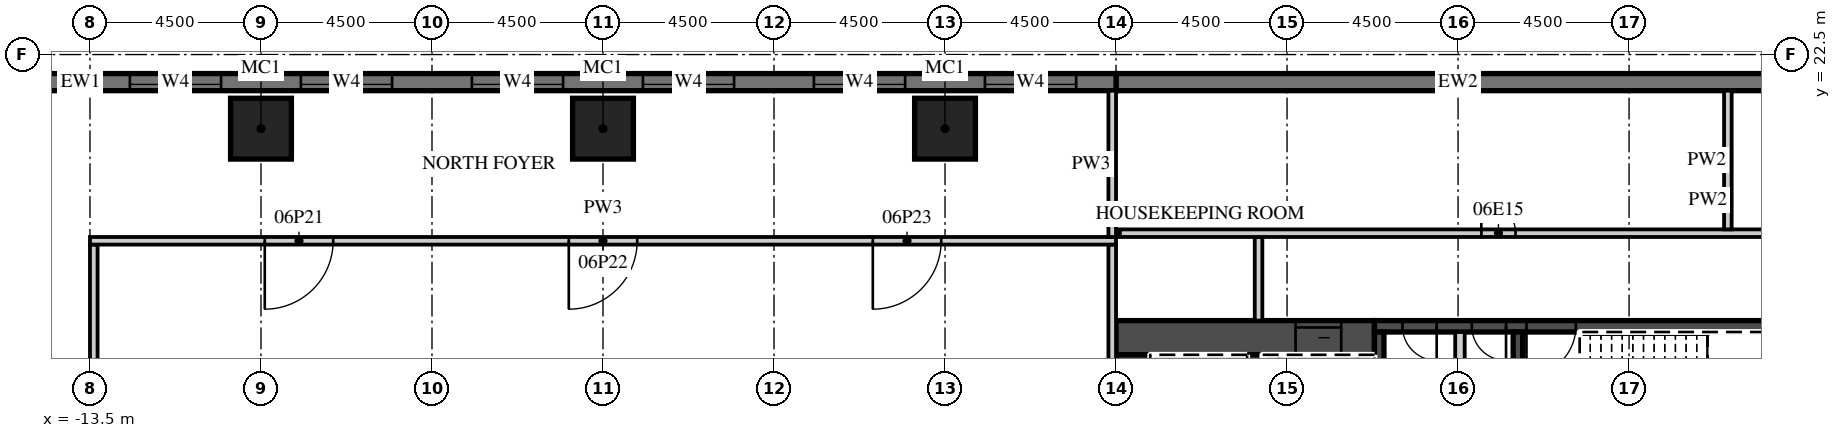
"""IFC4 building model, lengths in metres.
Left out: names, types, materials, properties, quantities, classifications, styles, units other than length and angle.
Written with IfcOpenShell. Run it as: python <this file> out.ifc"""

import sys

from ifc_helpers import new_model, si_unit, direction, frame, frame_2d, origin, origin_2d, place, context, subcontext, project, spatial, rectangle, extrude, element, fill, save


model = new_model("IFC4")
c1 = context("Model", 3, precision=1e-05, world=origin(), true_north=direction((0.0, 1.0)))
c2 = subcontext(c1, "Body", "Model", "MODEL_VIEW")
j1 = project(units=[si_unit("LENGTHUNIT", "METRE"), si_unit("PLANEANGLEUNIT", "RADIAN")], contexts=[c1])
p1 = place(None, origin())
s1 = spatial("IfcSite", under=j1, at=p1, CompositionType="ELEMENT")
p2 = place(p1, origin())
s2 = spatial("IfcBuilding", under=s1, at=p2, CompositionType="ELEMENT")
p3 = place(p2, frame((0.0, 0.0, 38.0)))
s3 = spatial("IfcBuildingStorey", under=s2, at=p3, CompositionType="ELEMENT", Elevation=38.0)
for number, where, z_axis, x_axis in (
    (1, (-9.0, 20.55, 0.0), (0.0, 0.0, 1.0), (1.0, 0.0, 0.0)),
    (2, (0.0, 20.55, 0.0), (0.0, 0.0, 1.0), (1.0, 0.0, 0.0)),
    (3, (9.0, 20.55, 0.0), (0.0, 0.0, 1.0), (1.0, 0.0, 0.0)),
):
    element("IfcColumn", number, at=place(p3, frame(where, z_axis=z_axis, x_axis=x_axis)), inside=s3, PredefinedType="COLUMN", context=c2, shape_type="SweptSolid", body=[
        extrude(rectangle(XDim=1.6, YDim=1.6, at=origin_2d()), origin(), (0.0, 0.0, 1.0), 8.7),
    ])
p4 = place(p3, frame((31.5, 21.775, 0.0), z_axis=(0.0, 0.0, 1.0), x_axis=(-1.0, 0.0, 0.0)))
e4 = element("IfcWall", 4, at=p4, inside=s3, PredefinedType="SOLIDWALL", context=c2, shape_type="SweptSolid", body=[
    extrude(rectangle(XDim=18.0, YDim=0.45, at=frame_2d((9.0, 0.0))), origin(), (0.0, 0.0, 1.0), 8.7),
])
p5 = place(p3, frame((13.5, 21.775, 0.0), z_axis=(0.0, 0.0, 1.0), x_axis=(-1.0, 0.0, 0.0)))
e5 = element("IfcWall", 5, at=p5, inside=s3, PredefinedType="SOLIDWALL", context=c2, shape_type="SweptSolid", body=[
    extrude(rectangle(XDim=54.5, YDim=0.45, at=frame_2d((27.25, 0.0))), origin(), (0.0, 0.0, 1.0), 8.7),
])
p6 = place(p5, frame((1.05, 0.0, 0.9)))
e6 = element("IfcOpeningElement", 6, at=p6, cuts=e5, PredefinedType="OPENING", context=c2, shape_type="SweptSolid", body=[
    extrude(rectangle(XDim=2.4, YDim=1.8, at=frame_2d((1.2, 0.9))), frame((0.0, 0.235, 0.0), z_axis=(0.0, -1.0, 0.0), x_axis=(1.0, 0.0, 0.0)), (0.0, 0.0, 1.0), 0.47),
])
p7 = place(p5, frame((5.55, 0.0, 0.9)))
e7 = element("IfcOpeningElement", 7, at=p7, cuts=e5, PredefinedType="OPENING", context=c2, shape_type="SweptSolid", body=[
    extrude(rectangle(XDim=2.4, YDim=1.8, at=frame_2d((1.2, 0.9))), frame((0.0, 0.235, 0.0), z_axis=(0.0, -1.0, 0.0), x_axis=(1.0, 0.0, 0.0)), (0.0, 0.0, 1.0), 0.47),
])
p8 = place(p5, frame((10.05, 0.0, 0.9)))
e8 = element("IfcOpeningElement", 8, at=p8, cuts=e5, PredefinedType="OPENING", context=c2, shape_type="SweptSolid", body=[
    extrude(rectangle(XDim=2.4, YDim=1.8, at=frame_2d((1.2, 0.9))), frame((0.0, 0.235, 0.0), z_axis=(0.0, -1.0, 0.0), x_axis=(1.0, 0.0, 0.0)), (0.0, 0.0, 1.0), 0.47),
])
p9 = place(p5, frame((14.55, 0.0, 0.9)))
e9 = element("IfcOpeningElement", 9, at=p9, cuts=e5, PredefinedType="OPENING", context=c2, shape_type="SweptSolid", body=[
    extrude(rectangle(XDim=2.4, YDim=1.8, at=frame_2d((1.2, 0.9))), frame((0.0, 0.235, 0.0), z_axis=(0.0, -1.0, 0.0), x_axis=(1.0, 0.0, 0.0)), (0.0, 0.0, 1.0), 0.47),
])
p10 = place(p5, frame((19.05, 0.0, 0.9)))
e10 = element("IfcOpeningElement", 10, at=p10, cuts=e5, PredefinedType="OPENING", context=c2, shape_type="SweptSolid", body=[
    extrude(rectangle(XDim=2.4, YDim=1.8, at=frame_2d((1.2, 0.9))), frame((0.0, 0.235, 0.0), z_axis=(0.0, -1.0, 0.0), x_axis=(1.0, 0.0, 0.0)), (0.0, 0.0, 1.0), 0.47),
])
p11 = place(p5, frame((23.55, 0.0, 0.9)))
e11 = element("IfcOpeningElement", 11, at=p11, cuts=e5, PredefinedType="OPENING", context=c2, shape_type="SweptSolid", body=[
    extrude(rectangle(XDim=2.4, YDim=1.8, at=frame_2d((1.2, 0.9))), frame((0.0, 0.235, 0.0), z_axis=(0.0, -1.0, 0.0), x_axis=(1.0, 0.0, 0.0)), (0.0, 0.0, 1.0), 0.47),
])
p12 = place(p5, frame((28.05, 0.0, 0.9)))
e12 = element("IfcOpeningElement", 12, at=p12, cuts=e5, PredefinedType="OPENING", context=c2, shape_type="SweptSolid", body=[
    extrude(rectangle(XDim=2.4, YDim=1.8, at=frame_2d((1.2, 0.9))), frame((0.0, 0.235, 0.0), z_axis=(0.0, -1.0, 0.0), x_axis=(1.0, 0.0, 0.0)), (0.0, 0.0, 1.0), 0.47),
])
p13 = place(p5, frame((32.55, 0.0, 0.9)))
e13 = element("IfcOpeningElement", 13, at=p13, cuts=e5, PredefinedType="OPENING", context=c2, shape_type="SweptSolid", body=[
    extrude(rectangle(XDim=2.4, YDim=1.8, at=frame_2d((1.2, 0.9))), frame((0.0, 0.235, 0.0), z_axis=(0.0, -1.0, 0.0), x_axis=(1.0, 0.0, 0.0)), (0.0, 0.0, 1.0), 0.47),
])
p14 = place(p5, frame((37.05, 0.0, 0.9)))
e14 = element("IfcOpeningElement", 14, at=p14, cuts=e5, PredefinedType="OPENING", context=c2, shape_type="SweptSolid", body=[
    extrude(rectangle(XDim=2.4, YDim=1.8, at=frame_2d((1.2, 0.9))), frame((0.0, 0.235, 0.0), z_axis=(0.0, -1.0, 0.0), x_axis=(1.0, 0.0, 0.0)), (0.0, 0.0, 1.0), 0.47),
])
p15 = place(p5, frame((41.55, 0.0, 0.9)))
e15 = element("IfcOpeningElement", 15, at=p15, cuts=e5, PredefinedType="OPENING", context=c2, shape_type="SweptSolid", body=[
    extrude(rectangle(XDim=2.4, YDim=1.8, at=frame_2d((1.2, 0.9))), frame((0.0, 0.235, 0.0), z_axis=(0.0, -1.0, 0.0), x_axis=(1.0, 0.0, 0.0)), (0.0, 0.0, 1.0), 0.47),
])
p16 = place(p5, frame((46.05, 0.0, 0.9)))
e16 = element("IfcOpeningElement", 16, at=p16, cuts=e5, PredefinedType="OPENING", context=c2, shape_type="SweptSolid", body=[
    extrude(rectangle(XDim=2.4, YDim=1.8, at=frame_2d((1.2, 0.9))), frame((0.0, 0.235, 0.0), z_axis=(0.0, -1.0, 0.0), x_axis=(1.0, 0.0, 0.0)), (0.0, 0.0, 1.0), 0.47),
])
p17 = place(p3, frame((13.5, 15.05, 0.0), z_axis=(0.0, 0.0, 1.0), x_axis=(1.0, 0.0, 0.0)))
e17 = element("IfcWall", 17, at=p17, inside=s3, PredefinedType="SHEAR", context=c2, shape_type="SweptSolid", body=[
    extrude(rectangle(XDim=6.8, YDim=0.9, at=frame_2d((3.4, 0.0))), origin(), (0.0, 0.0, 1.0), 8.7),
])
p18 = place(p17, frame((4.725, 0.0, 0.0)))
e18 = element("IfcOpeningElement", 18, at=p18, cuts=e17, PredefinedType="OPENING", context=c2, shape_type="SweptSolid", body=[
    extrude(rectangle(XDim=1.2, YDim=2.1, at=frame_2d((0.6, 1.05))), frame((0.0, 0.46, 0.0), z_axis=(0.0, -1.0, 0.0), x_axis=(1.0, 0.0, 0.0)), (0.0, 0.0, 1.0), 0.92),
])
p19 = place(p3, frame((20.3, 15.35, 0.0), z_axis=(0.0, 0.0, 1.0), x_axis=(1.0, 0.0, 0.0)))
e19 = element("IfcWall", 19, at=p19, inside=s3, PredefinedType="SHEAR", context=c2, shape_type="SweptSolid", body=[
    extrude(rectangle(XDim=10.3, YDim=0.3, at=frame_2d((5.15, 0.0))), origin(), (0.0, 0.0, 1.0), 8.7),
])
p20 = place(p19, frame((4.0, 0.0, 0.0)))
e20 = element("IfcOpeningElement", 20, at=p20, cuts=e19, PredefinedType="OPENING", context=c2, shape_type="SweptSolid", body=[
    extrude(rectangle(XDim=1.3, YDim=2.1, at=frame_2d((0.65, 1.05))), frame((0.0, 0.16, 0.0), z_axis=(0.0, -1.0, 0.0), x_axis=(1.0, 0.0, 0.0)), (0.0, 0.0, 1.0), 0.32),
])
p21 = place(p19, frame((2.562, 0.0, 0.0)))
e21 = element("IfcOpeningElement", 21, at=p21, cuts=e19, PredefinedType="OPENING", context=c2, shape_type="SweptSolid", body=[
    extrude(rectangle(XDim=0.9, YDim=2.1, at=frame_2d((0.45, 1.05))), frame((0.0, 0.16, 0.0), z_axis=(0.0, -1.0, 0.0), x_axis=(1.0, 0.0, 0.0)), (0.0, 0.0, 1.0), 0.32),
])
p22 = place(p19, frame((0.738, 0.0, 0.0)))
e22 = element("IfcOpeningElement", 22, at=p22, cuts=e19, PredefinedType="OPENING", context=c2, shape_type="SweptSolid", body=[
    extrude(rectangle(XDim=0.9, YDim=2.1, at=frame_2d((0.45, 1.05))), frame((0.0, 0.16, 0.0), z_axis=(0.0, -1.0, 0.0), x_axis=(1.0, 0.0, 0.0)), (0.0, 0.0, 1.0), 0.32),
])
p23 = place(p3, frame((13.95, 2.4, 0.0), z_axis=(0.0, 0.0, 1.0), x_axis=(0.0, 1.0, 0.0)))
e23 = element("IfcWall", 23, at=p23, inside=s3, PredefinedType="SHEAR", context=c2, shape_type="SweptSolid", body=[
    extrude(rectangle(XDim=12.2, YDim=0.9, at=frame_2d((6.1, 0.0))), origin(), (0.0, 0.0, 1.0), 8.7),
])
p24 = place(p3, frame((17.15, 8.8, 0.0), z_axis=(0.0, 0.0, 1.0), x_axis=(0.0, 1.0, 0.0)))
e24 = element("IfcWall", 24, at=p24, inside=s3, PredefinedType="SHEAR", context=c2, shape_type="SweptSolid", body=[
    extrude(rectangle(XDim=5.8, YDim=0.4, at=frame_2d((2.9, 0.0))), origin(), (0.0, 0.0, 1.0), 8.7),
])
for number, where, z_axis, x_axis in (
    (25, (20.425, 11.95, 0.0), (0.0, 0.0, 1.0), (0.0, 1.0, 0.0)),
    (26, (24.075, 11.95, 0.0), (0.0, 0.0, 1.0), (0.0, 1.0, 0.0)),
):
    element("IfcWall", number, at=place(p3, frame(where, z_axis=z_axis, x_axis=x_axis)), inside=s3, PredefinedType="SHEAR", context=c2, shape_type="SweptSolid", body=[
        extrude(rectangle(XDim=3.25, YDim=0.25, at=frame_2d((1.625, 0.0))), origin(), (0.0, 0.0, 1.0), 8.7),
    ])
p25 = place(p3, frame((22.55, 11.95, 0.0), z_axis=(0.0, 0.0, 1.0), x_axis=(0.0, 1.0, 0.0)))
e27 = element("IfcWall", 27, at=p25, inside=s3, PredefinedType="PARTITIONING", context=c2, shape_type="SweptSolid", body=[
    extrude(rectangle(XDim=3.25, YDim=0.25, at=frame_2d((1.625, 0.0))), origin(), (0.0, 0.0, 1.0), 8.7),
])
p26 = place(p3, frame((17.25, 15.5, 0.0), z_axis=(0.0, 0.0, 1.0), x_axis=(0.0, 1.0, 0.0)))
e28 = element("IfcWall", 28, at=p26, inside=s3, PredefinedType="PARTITIONING", context=c2, shape_type="SweptSolid", body=[
    extrude(rectangle(XDim=2.2, YDim=0.2, at=frame_2d((1.1, 0.0))), origin(), (0.0, 0.0, 1.0), 8.7),
])
p27 = place(p3, frame((13.6, 17.8, 0.0), z_axis=(0.0, 0.0, 1.0), x_axis=(1.0, 0.0, 0.0)))
e29 = element("IfcWall", 29, at=p27, inside=s3, PredefinedType="PARTITIONING", context=c2, shape_type="SweptSolid", body=[
    extrude(rectangle(XDim=30.95, YDim=0.2, at=frame_2d((15.475, 0.0))), origin(), (0.0, 0.0, 1.0), 8.7),
])
p28 = place(p27, frame((17.812, 0.0, 0.0)))
e30 = element("IfcOpeningElement", 30, at=p28, cuts=e29, PredefinedType="OPENING", context=c2, shape_type="SweptSolid", body=[
    extrude(rectangle(XDim=0.9, YDim=2.1, at=frame_2d((0.45, 1.05))), frame((0.0, 0.11, 0.0), z_axis=(0.0, -1.0, 0.0), x_axis=(1.0, 0.0, 0.0)), (0.0, 0.0, 1.0), 0.22),
])
p29 = place(p27, frame((9.512, 0.0, 0.0)))
e31 = element("IfcOpeningElement", 31, at=p29, cuts=e29, PredefinedType="OPENING", context=c2, shape_type="SweptSolid", body=[
    extrude(rectangle(XDim=0.9, YDim=2.1, at=frame_2d((0.45, 1.05))), frame((0.0, 0.11, 0.0), z_axis=(0.0, -1.0, 0.0), x_axis=(1.0, 0.0, 0.0)), (0.0, 0.0, 1.0), 0.22),
])
p30 = place(p3, frame((29.6, 17.9, 0.0), z_axis=(0.0, 0.0, 1.0), x_axis=(0.0, 1.0, 0.0)))
e32 = element("IfcWall", 32, at=p30, inside=s3, PredefinedType="PARTITIONING", context=c2, shape_type="SweptSolid", body=[
    extrude(rectangle(XDim=3.65, YDim=0.2, at=frame_2d((1.825, 0.0))), origin(), (0.0, 0.0, 1.0), 8.7),
])
p31 = place(p3, frame((-13.4, -17.5, 0.0), z_axis=(0.0, 0.0, 1.0), x_axis=(0.0, 1.0, 0.0)))
e33 = element("IfcWall", 33, at=p31, inside=s3, PredefinedType="PARTITIONING", context=c2, shape_type="SweptSolid", body=[
    extrude(rectangle(XDim=35.0, YDim=0.2, at=frame_2d((17.5, 0.0))), origin(), (0.0, 0.0, 1.0), 8.7),
])
p32 = place(p31, frame((22.6, 0.0, 0.0)))
e34 = element("IfcOpeningElement", 34, at=p32, cuts=e33, PredefinedType="OPENING", context=c2, shape_type="SweptSolid", body=[
    extrude(rectangle(XDim=1.8, YDim=2.1, at=frame_2d((0.9, 1.05))), frame((0.0, 0.11, 0.0), z_axis=(0.0, -1.0, 0.0), x_axis=(1.0, 0.0, 0.0)), (0.0, 0.0, 1.0), 0.22),
])
p33 = place(p31, frame((28.6, 0.0, 0.0)))
e35 = element("IfcOpeningElement", 35, at=p33, cuts=e33, PredefinedType="OPENING", context=c2, shape_type="SweptSolid", body=[
    extrude(rectangle(XDim=1.8, YDim=2.1, at=frame_2d((0.9, 1.05))), frame((0.0, 0.11, 0.0), z_axis=(0.0, -1.0, 0.0), x_axis=(1.0, 0.0, 0.0)), (0.0, 0.0, 1.0), 0.22),
])
p34 = place(p3, frame((13.4, -17.5, 0.0), z_axis=(0.0, 0.0, 1.0), x_axis=(0.0, 1.0, 0.0)))
e36 = element("IfcWall", 36, at=p34, inside=s3, PredefinedType="PARTITIONING", context=c2, shape_type="SweptSolid", body=[
    extrude(rectangle(XDim=35.0, YDim=0.2, at=frame_2d((17.5, 0.0))), origin(), (0.0, 0.0, 1.0), 8.7),
])
p35 = place(p34, frame((10.6, 0.0, 0.0)))
e37 = element("IfcOpeningElement", 37, at=p35, cuts=e36, PredefinedType="OPENING", context=c2, shape_type="SweptSolid", body=[
    extrude(rectangle(XDim=1.8, YDim=2.1, at=frame_2d((0.9, 1.05))), frame((0.0, 0.11, 0.0), z_axis=(0.0, -1.0, 0.0), x_axis=(1.0, 0.0, 0.0)), (0.0, 0.0, 1.0), 0.22),
])
p36 = place(p34, frame((4.6, 0.0, 0.0)))
e38 = element("IfcOpeningElement", 38, at=p36, cuts=e36, PredefinedType="OPENING", context=c2, shape_type="SweptSolid", body=[
    extrude(rectangle(XDim=1.8, YDim=2.1, at=frame_2d((0.9, 1.05))), frame((0.0, 0.11, 0.0), z_axis=(0.0, -1.0, 0.0), x_axis=(1.0, 0.0, 0.0)), (0.0, 0.0, 1.0), 0.22),
])
p37 = place(p3, frame((-13.5, 17.6, 0.0), z_axis=(0.0, 0.0, 1.0), x_axis=(1.0, 0.0, 0.0)))
e39 = element("IfcWall", 39, at=p37, inside=s3, PredefinedType="PARTITIONING", context=c2, shape_type="SweptSolid", body=[
    extrude(rectangle(XDim=27.0, YDim=0.2, at=frame_2d((13.5, 0.0))), origin(), (0.0, 0.0, 1.0), 8.7),
])
p38 = place(p37, frame((4.6, 0.0, 0.0)))
e40 = element("IfcOpeningElement", 40, at=p38, cuts=e39, PredefinedType="OPENING", context=c2, shape_type="SweptSolid", body=[
    extrude(rectangle(XDim=1.8, YDim=2.1, at=frame_2d((0.9, 1.05))), frame((0.0, 0.11, 0.0), z_axis=(0.0, -1.0, 0.0), x_axis=(1.0, 0.0, 0.0)), (0.0, 0.0, 1.0), 0.22),
])
p39 = place(p37, frame((12.6, 0.0, 0.0)))
e41 = element("IfcOpeningElement", 41, at=p39, cuts=e39, PredefinedType="OPENING", context=c2, shape_type="SweptSolid", body=[
    extrude(rectangle(XDim=1.8, YDim=2.1, at=frame_2d((0.9, 1.05))), frame((0.0, 0.11, 0.0), z_axis=(0.0, -1.0, 0.0), x_axis=(1.0, 0.0, 0.0)), (0.0, 0.0, 1.0), 0.22),
])
p40 = place(p37, frame((20.6, 0.0, 0.0)))
e42 = element("IfcOpeningElement", 42, at=p40, cuts=e39, PredefinedType="OPENING", context=c2, shape_type="SweptSolid", body=[
    extrude(rectangle(XDim=1.8, YDim=2.1, at=frame_2d((0.9, 1.05))), frame((0.0, 0.11, 0.0), z_axis=(0.0, -1.0, 0.0), x_axis=(1.0, 0.0, 0.0)), (0.0, 0.0, 1.0), 0.22),
])
p41 = place(p3, frame((13.4, 17.7, 0.0), z_axis=(0.0, 0.0, 1.0), x_axis=(0.0, 1.0, 0.0)))
e43 = element("IfcWall", 43, at=p41, inside=s3, PredefinedType="PARTITIONING", context=c2, shape_type="SweptSolid", body=[
    extrude(rectangle(XDim=3.85, YDim=0.2, at=frame_2d((1.925, 0.0))), origin(), (0.0, 0.0, 1.0), 8.7),
])
p42 = place(p6, origin())
e44 = element("IfcWindow", 44, at=p42, inside=s3, PartitioningType="SINGLE_PANEL", PredefinedType="WINDOW", context=c2, shape_type="SweptSolid", body=[
    extrude(rectangle(XDim=2.4, YDim=1.8, at=frame_2d((1.2, 0.9))), frame((0.0, 0.09, 0.0), z_axis=(0.0, -1.0, 0.0), x_axis=(1.0, 0.0, 0.0)), (0.0, 0.0, 1.0), 0.06),
])
fill(e6, e44)
p43 = place(p7, origin())
e45 = element("IfcWindow", 45, at=p43, inside=s3, PartitioningType="SINGLE_PANEL", PredefinedType="WINDOW", context=c2, shape_type="SweptSolid", body=[
    extrude(rectangle(XDim=2.4, YDim=1.8, at=frame_2d((1.2, 0.9))), frame((0.0, 0.09, 0.0), z_axis=(0.0, -1.0, 0.0), x_axis=(1.0, 0.0, 0.0)), (0.0, 0.0, 1.0), 0.06),
])
fill(e7, e45)
p44 = place(p8, origin())
e46 = element("IfcWindow", 46, at=p44, inside=s3, PartitioningType="SINGLE_PANEL", PredefinedType="WINDOW", context=c2, shape_type="SweptSolid", body=[
    extrude(rectangle(XDim=2.4, YDim=1.8, at=frame_2d((1.2, 0.9))), frame((0.0, 0.09, 0.0), z_axis=(0.0, -1.0, 0.0), x_axis=(1.0, 0.0, 0.0)), (0.0, 0.0, 1.0), 0.06),
])
fill(e8, e46)
p45 = place(p9, origin())
e47 = element("IfcWindow", 47, at=p45, inside=s3, PartitioningType="SINGLE_PANEL", PredefinedType="WINDOW", context=c2, shape_type="SweptSolid", body=[
    extrude(rectangle(XDim=2.4, YDim=1.8, at=frame_2d((1.2, 0.9))), frame((0.0, 0.09, 0.0), z_axis=(0.0, -1.0, 0.0), x_axis=(1.0, 0.0, 0.0)), (0.0, 0.0, 1.0), 0.06),
])
fill(e9, e47)
p46 = place(p10, origin())
e48 = element("IfcWindow", 48, at=p46, inside=s3, PartitioningType="SINGLE_PANEL", PredefinedType="WINDOW", context=c2, shape_type="SweptSolid", body=[
    extrude(rectangle(XDim=2.4, YDim=1.8, at=frame_2d((1.2, 0.9))), frame((0.0, 0.09, 0.0), z_axis=(0.0, -1.0, 0.0), x_axis=(1.0, 0.0, 0.0)), (0.0, 0.0, 1.0), 0.06),
])
fill(e10, e48)
p47 = place(p11, origin())
e49 = element("IfcWindow", 49, at=p47, inside=s3, PartitioningType="SINGLE_PANEL", PredefinedType="WINDOW", context=c2, shape_type="SweptSolid", body=[
    extrude(rectangle(XDim=2.4, YDim=1.8, at=frame_2d((1.2, 0.9))), frame((0.0, 0.09, 0.0), z_axis=(0.0, -1.0, 0.0), x_axis=(1.0, 0.0, 0.0)), (0.0, 0.0, 1.0), 0.06),
])
fill(e11, e49)
p48 = place(p18, origin())
e50 = element("IfcDoor", 50, at=p48, inside=s3, OperationType="SLIDING_TO_LEFT", PredefinedType="DOOR", context=c2, shape_type="SweptSolid", body=[
    extrude(rectangle(XDim=1.2, YDim=2.1, at=frame_2d((0.6, 1.05))), frame((0.0, 0.025, 0.0), z_axis=(0.0, -1.0, 0.0), x_axis=(1.0, 0.0, 0.0)), (0.0, 0.0, 1.0), 0.05),
])
fill(e18, e50)
p49 = place(p20, origin())
e51 = element("IfcDoor", 51, at=p49, inside=s3, OperationType="SINGLE_SWING_LEFT", PredefinedType="DOOR", context=c2, shape_type="SweptSolid", body=[
    extrude(rectangle(XDim=1.3, YDim=2.1, at=frame_2d((0.65, 1.05))), frame((0.0, 0.025, 0.0), z_axis=(0.0, -1.0, 0.0), x_axis=(1.0, 0.0, 0.0)), (0.0, 0.0, 1.0), 0.05),
])
fill(e20, e51)
p50 = place(p21, origin())
e52 = element("IfcDoor", 52, at=p50, inside=s3, OperationType="SINGLE_SWING_RIGHT", PredefinedType="DOOR", context=c2, shape_type="SweptSolid", body=[
    extrude(rectangle(XDim=0.9, YDim=2.1, at=frame_2d((0.45, 1.05))), frame((0.0, 0.025, 0.0), z_axis=(0.0, -1.0, 0.0), x_axis=(1.0, 0.0, 0.0)), (0.0, 0.0, 1.0), 0.05),
])
fill(e21, e52)
p51 = place(p22, origin())
e53 = element("IfcDoor", 53, at=p51, inside=s3, OperationType="SINGLE_SWING_RIGHT", PredefinedType="DOOR", context=c2, shape_type="SweptSolid", body=[
    extrude(rectangle(XDim=0.9, YDim=2.1, at=frame_2d((0.45, 1.05))), frame((0.0, 0.025, 0.0), z_axis=(0.0, -1.0, 0.0), x_axis=(1.0, 0.0, 0.0)), (0.0, 0.0, 1.0), 0.05),
])
fill(e22, e53)
p52 = place(p29, origin())
e54 = element("IfcDoor", 54, at=p52, inside=s3, OperationType="SINGLE_SWING_LEFT", PredefinedType="DOOR", context=c2, shape_type="SweptSolid", body=[
    extrude(rectangle(XDim=0.9, YDim=2.1, at=frame_2d((0.45, 1.05))), frame((0.0, 0.025, 0.0), z_axis=(0.0, -1.0, 0.0), x_axis=(1.0, 0.0, 0.0)), (0.0, 0.0, 1.0), 0.05),
])
fill(e31, e54)
p53 = place(p38, origin())
e55 = element("IfcDoor", 55, at=p53, inside=s3, OperationType="DOUBLE_DOOR_DOUBLE_SWING", PredefinedType="DOOR", context=c2, shape_type="SweptSolid", body=[
    extrude(rectangle(XDim=1.8, YDim=2.1, at=frame_2d((0.9, 1.05))), frame((0.0, 0.025, 0.0), z_axis=(0.0, -1.0, 0.0), x_axis=(1.0, 0.0, 0.0)), (0.0, 0.0, 1.0), 0.05),
])
fill(e40, e55)
p54 = place(p39, origin())
e56 = element("IfcDoor", 56, at=p54, inside=s3, OperationType="DOUBLE_DOOR_DOUBLE_SWING", PredefinedType="DOOR", context=c2, shape_type="SweptSolid", body=[
    extrude(rectangle(XDim=1.8, YDim=2.1, at=frame_2d((0.9, 1.05))), frame((0.0, 0.025, 0.0), z_axis=(0.0, -1.0, 0.0), x_axis=(1.0, 0.0, 0.0)), (0.0, 0.0, 1.0), 0.05),
])
fill(e41, e56)
p55 = place(p40, origin())
e57 = element("IfcDoor", 57, at=p55, inside=s3, OperationType="DOUBLE_DOOR_DOUBLE_SWING", PredefinedType="DOOR", context=c2, shape_type="SweptSolid", body=[
    extrude(rectangle(XDim=1.8, YDim=2.1, at=frame_2d((0.9, 1.05))), frame((0.0, 0.025, 0.0), z_axis=(0.0, -1.0, 0.0), x_axis=(1.0, 0.0, 0.0)), (0.0, 0.0, 1.0), 0.05),
])
fill(e42, e57)
save(model, sys.argv[1])
